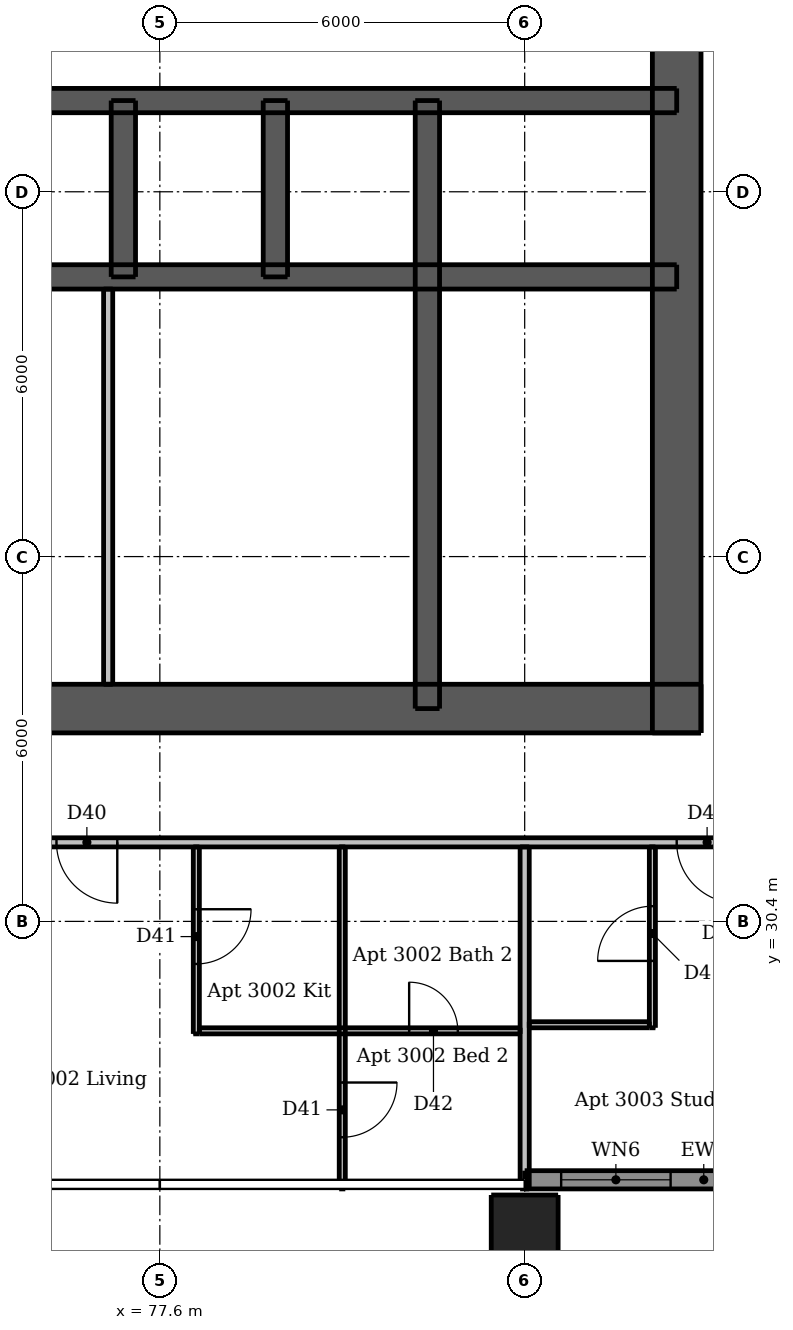
"""IFC4 building model, lengths in metres.
Left out: names, types, materials, properties, quantities, classifications, styles, units other than length and angle.
Written with IfcOpenShell. Run it as: python <this file> out.ifc"""

import sys

from ifc_helpers import new_model, si_unit, direction, frame, frame_2d, origin, origin_2d, place, context, subcontext, project, spatial, rectangle, extrude, element, fill, save


model = new_model("IFC4")
c1 = context("Model", 3, precision=1e-05, world=origin(), true_north=direction((0.0, 1.0)))
c2 = subcontext(c1, "Body", "Model", "MODEL_VIEW")
j1 = project(units=[si_unit("LENGTHUNIT", "METRE"), si_unit("PLANEANGLEUNIT", "RADIAN")], contexts=[c1])
p1 = place(None, origin())
s1 = spatial("IfcSite", under=j1, at=p1, CompositionType="ELEMENT")
p2 = place(p1, origin())
s2 = spatial("IfcBuilding", under=s1, at=p2, CompositionType="ELEMENT")
p3 = place(p2, frame((0.0, 0.0, 111.7)))
s3 = spatial("IfcBuildingStorey", under=s2, at=p3, CompositionType="ELEMENT", Elevation=111.7)
p4 = place(p3, frame((62.5, 33.9, 0.0), z_axis=(0.0, 0.0, 1.0), x_axis=(1.0, 0.0, 0.0)))
e1 = element("IfcWall", 1, at=p4, inside=s3, PredefinedType="SHEAR", context=c2, shape_type="SweptSolid", body=[
    extrude(rectangle(XDim=24.0, YDim=0.8, at=frame_2d((12.0, 0.0))), origin(), (0.0, 0.0, 1.0), 3.05),
])
p5 = place(p4, frame((2.0, 0.0, 0.0)))
e2 = element("IfcOpeningElement", 2, at=p5, cuts=e1, PredefinedType="OPENING", context=c2, shape_type="SweptSolid", body=[
    extrude(rectangle(XDim=1.1, YDim=2.1, at=frame_2d((0.55, 1.05))), frame((0.0, 0.41, 0.0), z_axis=(0.0, -1.0, 0.0), x_axis=(1.0, 0.0, 0.0)), (0.0, 0.0, 1.0), 0.82),
])
p6 = place(p4, frame((20.9, 0.0, 0.0)))
e3 = element("IfcOpeningElement", 3, at=p6, cuts=e1, PredefinedType="OPENING", context=c2, shape_type="SweptSolid", body=[
    extrude(rectangle(XDim=1.1, YDim=2.1, at=frame_2d((0.55, 1.05))), frame((0.0, 0.41, 0.0), z_axis=(0.0, -1.0, 0.0), x_axis=(1.0, 0.0, 0.0)), (0.0, 0.0, 1.0), 0.82),
])
p7 = place(p4, frame((8.0, 0.0, 0.0)))
e4 = element("IfcOpeningElement", 4, at=p7, cuts=e1, PredefinedType="OPENING", context=c2, shape_type="SweptSolid", body=[
    extrude(rectangle(XDim=1.1, YDim=2.1, at=frame_2d((0.55, 1.05))), frame((0.0, 0.41, 0.0), z_axis=(0.0, -1.0, 0.0), x_axis=(1.0, 0.0, 0.0)), (0.0, 0.0, 1.0), 0.82),
])
p8 = place(p4, frame((16.363, 0.0, 0.0)))
e5 = element("IfcOpeningElement", 5, at=p8, cuts=e1, PredefinedType="OPENING", context=c2, shape_type="SweptSolid", body=[
    extrude(rectangle(XDim=0.9, YDim=2.1, at=frame_2d((0.45, 1.05))), frame((0.0, 0.41, 0.0), z_axis=(0.0, -1.0, 0.0), x_axis=(1.0, 0.0, 0.0)), (0.0, 0.0, 1.0), 0.82),
])
p9 = place(p3, frame((86.1, 33.5, 0.0), z_axis=(0.0, 0.0, 1.0), x_axis=(0.0, 1.0, 0.0)))
e6 = element("IfcWall", 6, at=p9, inside=s3, PredefinedType="SHEAR", context=c2, shape_type="SweptSolid", body=[
    extrude(rectangle(XDim=24.0, YDim=0.8, at=frame_2d((12.0, 0.0))), origin(), (0.0, 0.0, 1.0), 3.05),
])
p10 = place(p9, frame((11.2, 0.0, 0.0)))
e7 = element("IfcOpeningElement", 7, at=p10, cuts=e6, PredefinedType="OPENING", context=c2, shape_type="SweptSolid", body=[
    extrude(rectangle(XDim=1.6, YDim=2.1, at=frame_2d((0.8, 1.05))), frame((0.0, 0.41, 0.0), z_axis=(0.0, -1.0, 0.0), x_axis=(1.0, 0.0, 0.0)), (0.0, 0.0, 1.0), 0.82),
])
p11 = place(p3, frame((62.9, 41.0, 0.0), z_axis=(0.0, 0.0, 1.0), x_axis=(1.0, 0.0, 0.0)))
e8 = element("IfcWall", 8, at=p11, inside=s3, PredefinedType="SHEAR", context=c2, shape_type="SweptSolid", body=[
    extrude(rectangle(XDim=23.2, YDim=0.4, at=frame_2d((11.6, 0.0))), origin(), (0.0, 0.0, 1.0), 3.05),
])
p12 = place(p3, frame((62.9, 43.9, 0.0), z_axis=(0.0, 0.0, 1.0), x_axis=(1.0, 0.0, 0.0)))
e9 = element("IfcWall", 9, at=p12, inside=s3, PredefinedType="SHEAR", context=c2, shape_type="SweptSolid", body=[
    extrude(rectangle(XDim=23.2, YDim=0.4, at=frame_2d((11.6, 0.0))), origin(), (0.0, 0.0, 1.0), 3.05),
])
p13 = place(p12, frame((0.63, 0.0, 0.0)))
e10 = element("IfcOpeningElement", 10, at=p13, cuts=e9, PredefinedType="OPENING", context=c2, shape_type="SweptSolid", body=[
    extrude(rectangle(XDim=0.8, YDim=2.1, at=frame_2d((0.4, 1.05))), frame((0.0, 0.21, 0.0), z_axis=(0.0, -1.0, 0.0), x_axis=(1.0, 0.0, 0.0)), (0.0, 0.0, 1.0), 0.42),
])
p14 = place(p12, frame((2.33, 0.0, 0.0)))
e11 = element("IfcOpeningElement", 11, at=p14, cuts=e9, PredefinedType="OPENING", context=c2, shape_type="SweptSolid", body=[
    extrude(rectangle(XDim=0.9, YDim=2.1, at=frame_2d((0.45, 1.05))), frame((0.0, 0.21, 0.0), z_axis=(0.0, -1.0, 0.0), x_axis=(1.0, 0.0, 0.0)), (0.0, 0.0, 1.0), 0.42),
])
p15 = place(p12, frame((20.6, 0.0, 0.0)))
e12 = element("IfcOpeningElement", 12, at=p15, cuts=e9, PredefinedType="OPENING", context=c2, shape_type="SweptSolid", body=[
    extrude(rectangle(XDim=0.9, YDim=2.1, at=frame_2d((0.45, 1.05))), frame((0.0, 0.21, 0.0), z_axis=(0.0, -1.0, 0.0), x_axis=(1.0, 0.0, 0.0)), (0.0, 0.0, 1.0), 0.42),
])
p16 = place(p12, frame((4.8, 0.0, 0.0)))
e13 = element("IfcOpeningElement", 13, at=p16, cuts=e9, PredefinedType="OPENING", context=c2, shape_type="SweptSolid", body=[
    extrude(rectangle(XDim=1.1, YDim=2.1, at=frame_2d((0.55, 1.05))), frame((0.0, 0.21, 0.0), z_axis=(0.0, -1.0, 0.0), x_axis=(1.0, 0.0, 0.0)), (0.0, 0.0, 1.0), 0.42),
])
p17 = place(p12, frame((7.3, 0.0, 0.0)))
e14 = element("IfcOpeningElement", 14, at=p17, cuts=e9, PredefinedType="OPENING", context=c2, shape_type="SweptSolid", body=[
    extrude(rectangle(XDim=1.1, YDim=2.1, at=frame_2d((0.55, 1.05))), frame((0.0, 0.21, 0.0), z_axis=(0.0, -1.0, 0.0), x_axis=(1.0, 0.0, 0.0)), (0.0, 0.0, 1.0), 0.42),
])
p18 = place(p12, frame((9.8, 0.0, 0.0)))
e15 = element("IfcOpeningElement", 15, at=p18, cuts=e9, PredefinedType="OPENING", context=c2, shape_type="SweptSolid", body=[
    extrude(rectangle(XDim=1.1, YDim=2.1, at=frame_2d((0.55, 1.05))), frame((0.0, 0.21, 0.0), z_axis=(0.0, -1.0, 0.0), x_axis=(1.0, 0.0, 0.0)), (0.0, 0.0, 1.0), 0.42),
])
p19 = place(p12, frame((12.3, 0.0, 0.0)))
e16 = element("IfcOpeningElement", 16, at=p19, cuts=e9, PredefinedType="OPENING", context=c2, shape_type="SweptSolid", body=[
    extrude(rectangle(XDim=1.1, YDim=2.1, at=frame_2d((0.55, 1.05))), frame((0.0, 0.21, 0.0), z_axis=(0.0, -1.0, 0.0), x_axis=(1.0, 0.0, 0.0)), (0.0, 0.0, 1.0), 0.42),
])
p20 = place(p12, frame((14.8, 0.0, 0.0)))
e17 = element("IfcOpeningElement", 17, at=p20, cuts=e9, PredefinedType="OPENING", context=c2, shape_type="SweptSolid", body=[
    extrude(rectangle(XDim=1.1, YDim=2.1, at=frame_2d((0.55, 1.05))), frame((0.0, 0.21, 0.0), z_axis=(0.0, -1.0, 0.0), x_axis=(1.0, 0.0, 0.0)), (0.0, 0.0, 1.0), 0.42),
])
p21 = place(p12, frame((17.3, 0.0, 0.0)))
e18 = element("IfcOpeningElement", 18, at=p21, cuts=e9, PredefinedType="OPENING", context=c2, shape_type="SweptSolid", body=[
    extrude(rectangle(XDim=1.1, YDim=2.1, at=frame_2d((0.55, 1.05))), frame((0.0, 0.21, 0.0), z_axis=(0.0, -1.0, 0.0), x_axis=(1.0, 0.0, 0.0)), (0.0, 0.0, 1.0), 0.42),
])
p22 = place(p3, frame((82.0, 33.9, 0.0), z_axis=(0.0, 0.0, 1.0), x_axis=(0.0, 1.0, 0.0)))
e19 = element("IfcWall", 19, at=p22, inside=s3, PredefinedType="SHEAR", context=c2, shape_type="SweptSolid", body=[
    extrude(rectangle(XDim=10.0, YDim=0.4, at=frame_2d((5.0, 0.0))), origin(), (0.0, 0.0, 1.0), 3.05),
])
for number, where, z_axis, x_axis in (
    (20, (77.0, 41.0, 0.0), (0.0, 0.0, 1.0), (0.0, 1.0, 0.0)),
    (21, (79.5, 41.0, 0.0), (0.0, 0.0, 1.0), (0.0, 1.0, 0.0)),
):
    element("IfcWall", number, at=place(p3, frame(where, z_axis=z_axis, x_axis=x_axis)), inside=s3, PredefinedType="SHEAR", context=c2, shape_type="SweptSolid", body=[
        extrude(rectangle(XDim=2.9, YDim=0.4, at=frame_2d((1.45, 0.0))), origin(), (0.0, 0.0, 1.0), 3.05),
    ])
p23 = place(p3, frame((83.6, 25.35, 0.0), z_axis=(0.0, 0.0, 1.0), x_axis=(1.0, 0.0, 0.0)))
e22 = element("IfcColumn", 22, at=p23, inside=s3, PredefinedType="COLUMN", context=c2, shape_type="SweptSolid", body=[
    extrude(rectangle(XDim=1.1, YDim=1.1, at=origin_2d()), origin(), (0.0, 0.0, 1.0), 3.05),
])
p24 = place(p3, frame((83.6, 26.15, 0.0), z_axis=(0.0, 0.0, 1.0), x_axis=(1.0, 0.0, 0.0)))
e23 = element("IfcWall", 23, at=p24, inside=s3, PredefinedType="SOLIDWALL", context=c2, shape_type="SweptSolid", body=[
    extrude(rectangle(XDim=5.89, YDim=0.3, at=frame_2d((2.945, 0.0))), origin(), (0.0, 0.0, 1.0), 3.05),
])
p25 = place(p24, frame((0.6, 0.0, 0.15)))
e24 = element("IfcOpeningElement", 24, at=p25, cuts=e23, PredefinedType="OPENING", context=c2, shape_type="SweptSolid", body=[
    extrude(rectangle(XDim=1.8, YDim=2.1, at=frame_2d((0.9, 1.05))), frame((0.0, 0.16, 0.0), z_axis=(0.0, -1.0, 0.0), x_axis=(1.0, 0.0, 0.0)), (0.0, 0.0, 1.0), 0.32),
])
p26 = place(p24, frame((3.6, 0.0, 0.15)))
e25 = element("IfcOpeningElement", 25, at=p26, cuts=e23, PredefinedType="OPENING", context=c2, shape_type="SweptSolid", body=[
    extrude(rectangle(XDim=1.8, YDim=2.1, at=frame_2d((0.9, 1.05))), frame((0.0, 0.16, 0.0), z_axis=(0.0, -1.0, 0.0), x_axis=(1.0, 0.0, 0.0)), (0.0, 0.0, 1.0), 0.32),
])
p27 = place(p3, frame((76.75, 34.3, 0.0), z_axis=(0.0, 0.0, 1.0), x_axis=(0.0, 1.0, 0.0)))
e26 = element("IfcWall", 26, at=p27, inside=s3, PredefinedType="PLUMBINGWALL", context=c2, shape_type="SweptSolid", body=[
    extrude(rectangle(XDim=6.5, YDim=0.15, at=frame_2d((3.25, 0.0))), origin(), (0.0, 0.0, 1.0), 3.05),
])
p28 = place(p3, frame((78.2, 31.625, 0.0), z_axis=(0.0, 0.0, 1.0), x_axis=(0.0, -1.0, 0.0)))
e27 = element("IfcWall", 27, at=p28, inside=s3, PredefinedType="PARTITIONING", context=c2, shape_type="SweptSolid", body=[
    extrude(rectangle(XDim=3.075, YDim=0.1, at=frame_2d((1.538, 0.0))), origin(), (0.0, 0.0, 1.0), 3.05),
])
p29 = place(p28, frame((1.025, 0.0, 0.0)))
e28 = element("IfcOpeningElement", 28, at=p29, cuts=e27, PredefinedType="OPENING", context=c2, shape_type="SweptSolid", body=[
    extrude(rectangle(XDim=0.9, YDim=2.1, at=frame_2d((0.45, 1.05))), frame((0.0, 0.06, 0.0), z_axis=(0.0, -1.0, 0.0), x_axis=(1.0, 0.0, 0.0)), (0.0, 0.0, 1.0), 0.12),
])
p30 = place(p3, frame((80.6, 31.625, 0.0), z_axis=(0.0, 0.0, 1.0), x_axis=(0.0, -1.0, 0.0)))
e29 = element("IfcWall", 29, at=p30, inside=s3, PredefinedType="PARTITIONING", context=c2, shape_type="SweptSolid", body=[
    extrude(rectangle(XDim=5.625, YDim=0.1, at=frame_2d((2.812, 0.0))), origin(), (0.0, 0.0, 1.0), 3.05),
])
p31 = place(p30, frame((3.875, 0.0, 0.0)))
e30 = element("IfcOpeningElement", 30, at=p31, cuts=e29, PredefinedType="OPENING", context=c2, shape_type="SweptSolid", body=[
    extrude(rectangle(XDim=0.9, YDim=2.1, at=frame_2d((0.45, 1.05))), frame((0.0, 0.06, 0.0), z_axis=(0.0, -1.0, 0.0), x_axis=(1.0, 0.0, 0.0)), (0.0, 0.0, 1.0), 0.12),
])
p32 = place(p3, frame((85.7, 28.65, 0.0), z_axis=(0.0, 0.0, 1.0), x_axis=(0.0, 1.0, 0.0)))
e31 = element("IfcWall", 31, at=p32, inside=s3, PredefinedType="PARTITIONING", context=c2, shape_type="SweptSolid", body=[
    extrude(rectangle(XDim=2.975, YDim=0.1, at=frame_2d((1.488, 0.0))), origin(), (0.0, 0.0, 1.0), 3.05),
])
p33 = place(p32, frame((1.1, 0.0, 0.0)))
e32 = element("IfcOpeningElement", 32, at=p33, cuts=e31, PredefinedType="OPENING", context=c2, shape_type="SweptSolid", body=[
    extrude(rectangle(XDim=0.9, YDim=2.1, at=frame_2d((0.45, 1.05))), frame((0.0, 0.06, 0.0), z_axis=(0.0, -1.0, 0.0), x_axis=(1.0, 0.0, 0.0)), (0.0, 0.0, 1.0), 0.12),
])
p34 = place(p3, frame((83.675, 28.7, 0.0), z_axis=(0.0, 0.0, 1.0), x_axis=(1.0, 0.0, 0.0)))
e33 = element("IfcWall", 33, at=p34, inside=s3, PredefinedType="PARTITIONING", context=c2, shape_type="SweptSolid", body=[
    extrude(rectangle(XDim=1.975, YDim=0.1, at=frame_2d((0.987, 0.0))), origin(), (0.0, 0.0, 1.0), 3.05),
])
p35 = place(p3, frame((78.25, 28.6, 0.0), z_axis=(0.0, 0.0, 1.0), x_axis=(1.0, 0.0, 0.0)))
e34 = element("IfcWall", 34, at=p35, inside=s3, PredefinedType="PARTITIONING", context=c2, shape_type="SweptSolid", body=[
    extrude(rectangle(XDim=5.275, YDim=0.1, at=frame_2d((2.637, 0.0))), origin(), (0.0, 0.0, 1.0), 3.05),
])
p36 = place(p35, frame((3.45, 0.0, 0.0)))
e35 = element("IfcOpeningElement", 35, at=p36, cuts=e34, PredefinedType="OPENING", context=c2, shape_type="SweptSolid", body=[
    extrude(rectangle(XDim=0.8, YDim=2.1, at=frame_2d((0.4, 1.05))), frame((0.0, 0.06, 0.0), z_axis=(0.0, -1.0, 0.0), x_axis=(1.0, 0.0, 0.0)), (0.0, 0.0, 1.0), 0.12),
])
p37 = place(p3, frame((83.6, 26.0, 0.0), z_axis=(0.0, 0.0, 1.0), x_axis=(0.0, 1.0, 0.0)))
e36 = element("IfcWall", 36, at=p37, inside=s3, PredefinedType="PARTITIONING", context=c2, shape_type="SweptSolid", body=[
    extrude(rectangle(XDim=5.625, YDim=0.15, at=frame_2d((2.812, 0.0))), origin(), (0.0, 0.0, 1.0), 2.589),
])
p38 = place(p3, frame((89.525, 31.7, 0.0), z_axis=(0.0, 0.0, 1.0), x_axis=(-1.0, 0.0, 0.0)))
e37 = element("IfcWall", 37, at=p38, inside=s3, PredefinedType="PARTITIONING", context=c2, shape_type="SweptSolid", body=[
    extrude(rectangle(XDim=28.75, YDim=0.15, at=frame_2d((14.375, 0.0))), origin(), (0.0, 0.0, 1.0), 3.05),
])
p39 = place(p38, frame((27.375, 0.0, 0.0)))
e38 = element("IfcOpeningElement", 38, at=p39, cuts=e37, PredefinedType="OPENING", context=c2, shape_type="SweptSolid", body=[
    extrude(rectangle(XDim=1.0, YDim=2.1, at=frame_2d((0.5, 1.05))), frame((0.0, 0.085, 0.0), z_axis=(0.0, -1.0, 0.0), x_axis=(1.0, 0.0, 0.0)), (0.0, 0.0, 1.0), 0.17),
])
p40 = place(p38, frame((12.625, 0.0, 0.0)))
e39 = element("IfcOpeningElement", 39, at=p40, cuts=e37, PredefinedType="OPENING", context=c2, shape_type="SweptSolid", body=[
    extrude(rectangle(XDim=1.0, YDim=2.1, at=frame_2d((0.5, 1.05))), frame((0.0, 0.085, 0.0), z_axis=(0.0, -1.0, 0.0), x_axis=(1.0, 0.0, 0.0)), (0.0, 0.0, 1.0), 0.17),
])
p41 = place(p38, frame((2.425, 0.0, 0.0)))
e40 = element("IfcOpeningElement", 40, at=p41, cuts=e37, PredefinedType="OPENING", context=c2, shape_type="SweptSolid", body=[
    extrude(rectangle(XDim=1.0, YDim=2.1, at=frame_2d((0.5, 1.05))), frame((0.0, 0.085, 0.0), z_axis=(0.0, -1.0, 0.0), x_axis=(1.0, 0.0, 0.0)), (0.0, 0.0, 1.0), 0.17),
])
p42 = place(p25, origin())
e41 = element("IfcWindow", 41, at=p42, inside=s3, PartitioningType="DOUBLE_PANEL_VERTICAL", PredefinedType="WINDOW", context=c2, shape_type="SweptSolid", body=[
    extrude(rectangle(XDim=1.8, YDim=2.1, at=frame_2d((0.9, 1.05))), frame((0.0, 0.03, 0.0), z_axis=(0.0, -1.0, 0.0), x_axis=(1.0, 0.0, 0.0)), (0.0, 0.0, 1.0), 0.06),
])
fill(e24, e41)
p43 = place(p6, origin())
e42 = element("IfcDoor", 42, at=p43, inside=s3, OperationType="SINGLE_SWING_RIGHT", PredefinedType="DOOR", context=c2, shape_type="SweptSolid", body=[
    extrude(rectangle(XDim=1.1, YDim=2.1, at=frame_2d((0.55, 1.05))), frame((0.0, 0.388, 0.0), z_axis=(0.0, -1.0, 0.0), x_axis=(1.0, 0.0, 0.0)), (0.0, 0.0, 1.0), 0.05),
])
fill(e3, e42)
p44 = place(p8, origin())
e43 = element("IfcDoor", 43, at=p44, inside=s3, OperationType="SINGLE_SWING_LEFT", PredefinedType="DOOR", context=c2, shape_type="SweptSolid", body=[
    extrude(rectangle(XDim=0.9, YDim=2.1, at=frame_2d((0.45, 1.05))), frame((0.0, 0.388, 0.0), z_axis=(0.0, -1.0, 0.0), x_axis=(1.0, 0.0, 0.0)), (0.0, 0.0, 1.0), 0.05),
])
fill(e5, e43)
p45 = place(p15, origin())
e44 = element("IfcDoor", 44, at=p45, inside=s3, OperationType="SINGLE_SWING_LEFT", PredefinedType="DOOR", context=c2, shape_type="SweptSolid", body=[
    extrude(rectangle(XDim=0.9, YDim=2.1, at=frame_2d((0.45, 1.05))), frame((0.0, -0.138, 0.0), z_axis=(0.0, -1.0, 0.0), x_axis=(1.0, 0.0, 0.0)), (0.0, 0.0, 1.0), 0.05),
])
fill(e12, e44)
p46 = place(p19, origin())
e45 = element("IfcDoor", 45, at=p46, inside=s3, OperationType="DOUBLE_DOOR_SLIDING", PredefinedType="DOOR", context=c2, shape_type="SweptSolid", body=[
    extrude(rectangle(XDim=1.1, YDim=2.1, at=frame_2d((0.55, 1.05))), frame((0.0, 0.025, 0.0), z_axis=(0.0, -1.0, 0.0), x_axis=(1.0, 0.0, 0.0)), (0.0, 0.0, 1.0), 0.05),
])
fill(e16, e45)
p47 = place(p20, origin())
e46 = element("IfcDoor", 46, at=p47, inside=s3, OperationType="DOUBLE_DOOR_SLIDING", PredefinedType="DOOR", context=c2, shape_type="SweptSolid", body=[
    extrude(rectangle(XDim=1.1, YDim=2.1, at=frame_2d((0.55, 1.05))), frame((0.0, 0.025, 0.0), z_axis=(0.0, -1.0, 0.0), x_axis=(1.0, 0.0, 0.0)), (0.0, 0.0, 1.0), 0.05),
])
fill(e17, e46)
p48 = place(p21, origin())
e47 = element("IfcDoor", 47, at=p48, inside=s3, OperationType="DOUBLE_DOOR_SLIDING", PredefinedType="DOOR", context=c2, shape_type="SweptSolid", body=[
    extrude(rectangle(XDim=1.1, YDim=2.1, at=frame_2d((0.55, 1.05))), frame((0.0, 0.025, 0.0), z_axis=(0.0, -1.0, 0.0), x_axis=(1.0, 0.0, 0.0)), (0.0, 0.0, 1.0), 0.05),
])
fill(e18, e47)
p49 = place(p40, origin())
e48 = element("IfcDoor", 48, at=p49, inside=s3, OperationType="SINGLE_SWING_LEFT", PredefinedType="DOOR", context=c2, shape_type="SweptSolid", body=[
    extrude(rectangle(XDim=1.0, YDim=2.1, at=frame_2d((0.5, 1.05))), frame((0.0, 0.025, 0.0), z_axis=(0.0, -1.0, 0.0), x_axis=(1.0, 0.0, 0.0)), (0.0, 0.0, 1.0), 0.05),
])
fill(e39, e48)
p50 = place(p29, origin())
e49 = element("IfcDoor", 49, at=p50, inside=s3, OperationType="SINGLE_SWING_LEFT", PredefinedType="DOOR", context=c2, shape_type="SweptSolid", body=[
    extrude(rectangle(XDim=0.9, YDim=2.1, at=frame_2d((0.45, 1.05))), frame((0.0, 0.025, 0.0), z_axis=(0.0, -1.0, 0.0), x_axis=(1.0, 0.0, 0.0)), (0.0, 0.0, 1.0), 0.05),
])
fill(e28, e49)
p51 = place(p31, origin())
e50 = element("IfcDoor", 50, at=p51, inside=s3, OperationType="SINGLE_SWING_LEFT", PredefinedType="DOOR", context=c2, shape_type="SweptSolid", body=[
    extrude(rectangle(XDim=0.9, YDim=2.1, at=frame_2d((0.45, 1.05))), frame((0.0, 0.025, 0.0), z_axis=(0.0, -1.0, 0.0), x_axis=(1.0, 0.0, 0.0)), (0.0, 0.0, 1.0), 0.05),
])
fill(e30, e50)
p52 = place(p36, origin())
e51 = element("IfcDoor", 51, at=p52, inside=s3, OperationType="SINGLE_SWING_LEFT", PredefinedType="DOOR", context=c2, shape_type="SweptSolid", body=[
    extrude(rectangle(XDim=0.8, YDim=2.1, at=frame_2d((0.4, 1.05))), frame((0.0, 0.025, 0.0), z_axis=(0.0, -1.0, 0.0), x_axis=(1.0, 0.0, 0.0)), (0.0, 0.0, 1.0), 0.05),
])
fill(e35, e51)
p53 = place(p41, origin())
e52 = element("IfcDoor", 52, at=p53, inside=s3, OperationType="SINGLE_SWING_LEFT", PredefinedType="DOOR", context=c2, shape_type="SweptSolid", body=[
    extrude(rectangle(XDim=1.0, YDim=2.1, at=frame_2d((0.5, 1.05))), frame((0.0, 0.025, 0.0), z_axis=(0.0, -1.0, 0.0), x_axis=(1.0, 0.0, 0.0)), (0.0, 0.0, 1.0), 0.05),
])
fill(e40, e52)
p54 = place(p33, origin())
e53 = element("IfcDoor", 53, at=p54, inside=s3, OperationType="SINGLE_SWING_LEFT", PredefinedType="DOOR", context=c2, shape_type="SweptSolid", body=[
    extrude(rectangle(XDim=0.9, YDim=2.1, at=frame_2d((0.45, 1.05))), frame((0.0, 0.025, 0.0), z_axis=(0.0, -1.0, 0.0), x_axis=(1.0, 0.0, 0.0)), (0.0, 0.0, 1.0), 0.05),
])
fill(e32, e53)
save(model, sys.argv[1])
